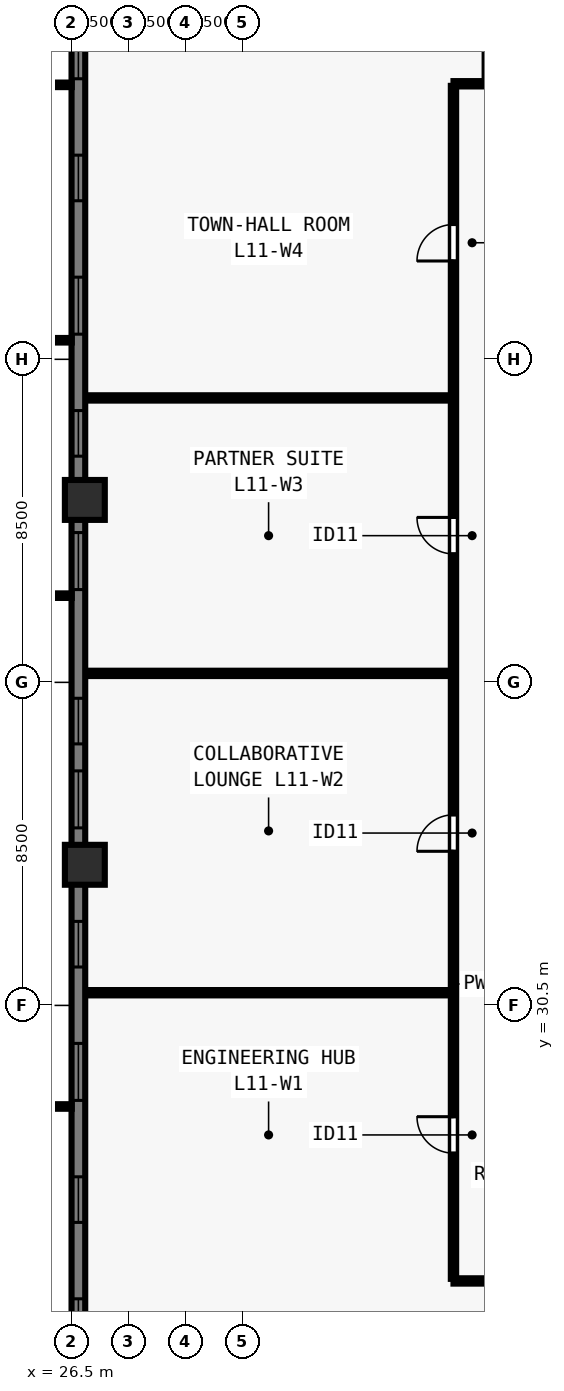
"""IFC4 building model, lengths in metres.
Left out: names, types, materials, properties, quantities, classifications, styles, units other than length and angle.
Written with IfcOpenShell. Run it as: python <this file> out.ifc"""

import sys

from ifc_helpers import new_model, si_unit, direction, frame, frame_2d, origin, origin_2d, place, context, subcontext, project, spatial, rectangle, extrude, element, fill, save


model = new_model("IFC4")
c1 = context("Model", 3, precision=1e-05, world=origin(), true_north=direction((0.0, 1.0)))
c2 = subcontext(c1, "Body", "Model", "MODEL_VIEW")
j1 = project(units=[si_unit("LENGTHUNIT", "METRE"), si_unit("PLANEANGLEUNIT", "RADIAN")], contexts=[c1])
p1 = place(None, origin())
s1 = spatial("IfcSite", under=j1, at=p1, CompositionType="ELEMENT")
p2 = place(p1, origin())
s2 = spatial("IfcBuilding", under=s1, at=p2, CompositionType="ELEMENT")
p3 = place(p2, frame((0.0, 0.0, 44.5)))
s3 = spatial("IfcBuildingStorey", under=s2, at=p3, CompositionType="ELEMENT", Elevation=44.5)
for number, where, z_axis, x_axis in (
    (1, (26.85, 43.8, 0.0), (0.0, 0.0, 1.0), (0.0, 1.0, 0.0)),
    (2, (26.85, 34.2, 0.0), (0.0, 0.0, 1.0), (0.0, 1.0, 0.0)),
):
    element("IfcColumn", number, at=place(p3, frame(where, z_axis=z_axis, x_axis=x_axis)), inside=s3, PredefinedType="COLUMN", context=c2, shape_type="SweptSolid", body=[
        extrude(rectangle(XDim=1.05, YDim=1.05, at=origin_2d()), origin(), (0.0, 0.0, 1.0), 3.5),
    ])
p4 = place(p3, frame((26.68, 16.5, 0.0), z_axis=(0.0, 0.0, 1.0), x_axis=(0.0, 1.0, 0.0)))
e3 = element("IfcWall", 3, at=p4, inside=s3, PredefinedType="SOLIDWALL", context=c2, shape_type="SweptSolid", body=[
    extrude(rectangle(XDim=44.662, YDim=0.36, at=frame_2d((22.331, 0.0))), origin(), (0.0, 0.0, 1.0), 3.28),
])
p5 = place(p4, frame((4.78, 0.0, 0.8)))
e4 = element("IfcOpeningElement", 4, at=p5, cuts=e3, PredefinedType="OPENING", context=c2, shape_type="SweptSolid", body=[
    extrude(rectangle(XDim=1.5, YDim=1.544, at=frame_2d((0.75, 0.772))), frame((0.0, 0.19, 0.0), z_axis=(0.0, -1.0, 0.0), x_axis=(1.0, 0.0, 0.0)), (0.0, 0.0, 1.0), 0.38),
])
p6 = place(p4, frame((8.29, 0.0, 0.8)))
e5 = element("IfcOpeningElement", 5, at=p6, cuts=e3, PredefinedType="OPENING", context=c2, shape_type="SweptSolid", body=[
    extrude(rectangle(XDim=1.2, YDim=1.544, at=frame_2d((0.6, 0.772))), frame((0.0, 0.19, 0.0), z_axis=(0.0, -1.0, 0.0), x_axis=(1.0, 0.0, 0.0)), (0.0, 0.0, 1.0), 0.38),
])
p7 = place(p4, frame((11.5, 0.0, 0.8)))
e6 = element("IfcOpeningElement", 6, at=p7, cuts=e3, PredefinedType="OPENING", context=c2, shape_type="SweptSolid", body=[
    extrude(rectangle(XDim=1.5, YDim=1.544, at=frame_2d((0.75, 0.772))), frame((0.0, 0.19, 0.0), z_axis=(0.0, -1.0, 0.0), x_axis=(1.0, 0.0, 0.0)), (0.0, 0.0, 1.0), 0.38),
])
p8 = place(p4, frame((15.01, 0.0, 0.8)))
e7 = element("IfcOpeningElement", 7, at=p8, cuts=e3, PredefinedType="OPENING", context=c2, shape_type="SweptSolid", body=[
    extrude(rectangle(XDim=1.2, YDim=1.544, at=frame_2d((0.6, 0.772))), frame((0.0, 0.19, 0.0), z_axis=(0.0, -1.0, 0.0), x_axis=(1.0, 0.0, 0.0)), (0.0, 0.0, 1.0), 0.38),
])
p9 = place(p4, frame((18.671, 0.0, 0.8)))
e8 = element("IfcOpeningElement", 8, at=p9, cuts=e3, PredefinedType="OPENING", context=c2, shape_type="SweptSolid", body=[
    extrude(rectangle(XDim=1.5, YDim=1.544, at=frame_2d((0.75, 0.772))), frame((0.0, 0.19, 0.0), z_axis=(0.0, -1.0, 0.0), x_axis=(1.0, 0.0, 0.0)), (0.0, 0.0, 1.0), 0.38),
])
p10 = place(p4, frame((20.881, 0.0, 0.8)))
e9 = element("IfcOpeningElement", 9, at=p10, cuts=e3, PredefinedType="OPENING", context=c2, shape_type="SweptSolid", body=[
    extrude(rectangle(XDim=1.2, YDim=1.544, at=frame_2d((0.6, 0.772))), frame((0.0, 0.19, 0.0), z_axis=(0.0, -1.0, 0.0), x_axis=(1.0, 0.0, 0.0)), (0.0, 0.0, 1.0), 0.38),
])
p11 = place(p4, frame((24.941, 0.0, 0.8)))
e10 = element("IfcOpeningElement", 10, at=p11, cuts=e3, PredefinedType="OPENING", context=c2, shape_type="SweptSolid", body=[
    extrude(rectangle(XDim=1.5, YDim=1.544, at=frame_2d((0.75, 0.772))), frame((0.0, 0.19, 0.0), z_axis=(0.0, -1.0, 0.0), x_axis=(1.0, 0.0, 0.0)), (0.0, 0.0, 1.0), 0.38),
])
p12 = place(p4, frame((28.451, 0.0, 0.8)))
e11 = element("IfcOpeningElement", 11, at=p12, cuts=e3, PredefinedType="OPENING", context=c2, shape_type="SweptSolid", body=[
    extrude(rectangle(XDim=1.2, YDim=1.544, at=frame_2d((0.6, 0.772))), frame((0.0, 0.19, 0.0), z_axis=(0.0, -1.0, 0.0), x_axis=(1.0, 0.0, 0.0)), (0.0, 0.0, 1.0), 0.38),
])
p13 = place(p4, frame((31.662, 0.0, 0.8)))
e12 = element("IfcOpeningElement", 12, at=p13, cuts=e3, PredefinedType="OPENING", context=c2, shape_type="SweptSolid", body=[
    extrude(rectangle(XDim=1.5, YDim=1.544, at=frame_2d((0.75, 0.772))), frame((0.0, 0.19, 0.0), z_axis=(0.0, -1.0, 0.0), x_axis=(1.0, 0.0, 0.0)), (0.0, 0.0, 1.0), 0.38),
])
p14 = place(p4, frame((35.172, 0.0, 0.8)))
e13 = element("IfcOpeningElement", 13, at=p14, cuts=e3, PredefinedType="OPENING", context=c2, shape_type="SweptSolid", body=[
    extrude(rectangle(XDim=1.2, YDim=1.544, at=frame_2d((0.6, 0.772))), frame((0.0, 0.19, 0.0), z_axis=(0.0, -1.0, 0.0), x_axis=(1.0, 0.0, 0.0)), (0.0, 0.0, 1.0), 0.38),
])
p15 = place(p4, frame((38.382, 0.0, 0.8)))
e14 = element("IfcOpeningElement", 14, at=p15, cuts=e3, PredefinedType="OPENING", context=c2, shape_type="SweptSolid", body=[
    extrude(rectangle(XDim=1.5, YDim=1.544, at=frame_2d((0.75, 0.772))), frame((0.0, 0.19, 0.0), z_axis=(0.0, -1.0, 0.0), x_axis=(1.0, 0.0, 0.0)), (0.0, 0.0, 1.0), 0.38),
])
p16 = place(p3, frame((36.55, 23.25, 0.0), z_axis=(0.0, 0.0, 1.0), x_axis=(1.0, 0.0, 0.0)))
e15 = element("IfcWall", 15, at=p16, inside=s3, PredefinedType="PARTITIONING", context=c2, shape_type="SweptSolid", body=[
    extrude(rectangle(XDim=30.9, YDim=0.14, at=frame_2d((15.45, 0.0))), origin(), (0.0, 0.0, 1.0), 3.28),
])
p17 = place(p16, frame((2.386, 0.0, 0.0)))
e16 = element("IfcOpeningElement", 16, at=p17, cuts=e15, PredefinedType="OPENING", context=c2, shape_type="SweptSolid", body=[
    extrude(rectangle(XDim=0.96, YDim=2.12, at=frame_2d((0.48, 1.06))), frame((0.0, 0.08, 0.0), z_axis=(0.0, -1.0, 0.0), x_axis=(1.0, 0.0, 0.0)), (0.0, 0.0, 1.0), 0.16),
])
p18 = place(p16, frame((27.066, 0.0, 0.0)))
e17 = element("IfcOpeningElement", 17, at=p18, cuts=e15, PredefinedType="OPENING", context=c2, shape_type="SweptSolid", body=[
    extrude(rectangle(XDim=0.96, YDim=2.12, at=frame_2d((0.48, 1.06))), frame((0.0, 0.08, 0.0), z_axis=(0.0, -1.0, 0.0), x_axis=(1.0, 0.0, 0.0)), (0.0, 0.0, 1.0), 0.16),
])
p19 = place(p3, frame((36.55, 54.75, 0.0), z_axis=(0.0, 0.0, 1.0), x_axis=(1.0, 0.0, 0.0)))
e18 = element("IfcWall", 18, at=p19, inside=s3, PredefinedType="PARTITIONING", context=c2, shape_type="SweptSolid", body=[
    extrude(rectangle(XDim=30.9, YDim=0.14, at=frame_2d((15.45, 0.0))), origin(), (0.0, 0.0, 1.0), 3.28),
])
p20 = place(p19, frame((3.69, 0.0, 0.0)))
e19 = element("IfcOpeningElement", 19, at=p20, cuts=e18, PredefinedType="OPENING", context=c2, shape_type="SweptSolid", body=[
    extrude(rectangle(XDim=0.96, YDim=2.12, at=frame_2d((0.48, 1.06))), frame((0.0, 0.08, 0.0), z_axis=(0.0, -1.0, 0.0), x_axis=(1.0, 0.0, 0.0)), (0.0, 0.0, 1.0), 0.16),
])
p21 = place(p19, frame((5.013, 0.0, 0.0)))
e20 = element("IfcOpeningElement", 20, at=p21, cuts=e18, PredefinedType="OPENING", context=c2, shape_type="SweptSolid", body=[
    extrude(rectangle(XDim=0.96, YDim=2.12, at=frame_2d((0.48, 1.06))), frame((0.0, 0.08, 0.0), z_axis=(0.0, -1.0, 0.0), x_axis=(1.0, 0.0, 0.0)), (0.0, 0.0, 1.0), 0.16),
])
p22 = place(p19, frame((15.045, 0.0, 0.0)))
e21 = element("IfcOpeningElement", 21, at=p22, cuts=e18, PredefinedType="OPENING", context=c2, shape_type="SweptSolid", body=[
    extrude(rectangle(XDim=0.96, YDim=2.12, at=frame_2d((0.48, 1.06))), frame((0.0, 0.08, 0.0), z_axis=(0.0, -1.0, 0.0), x_axis=(1.0, 0.0, 0.0)), (0.0, 0.0, 1.0), 0.16),
])
p23 = place(p19, frame((25.077, 0.0, 0.0)))
e22 = element("IfcOpeningElement", 22, at=p23, cuts=e18, PredefinedType="OPENING", context=c2, shape_type="SweptSolid", body=[
    extrude(rectangle(XDim=0.96, YDim=2.12, at=frame_2d((0.48, 1.06))), frame((0.0, 0.08, 0.0), z_axis=(0.0, -1.0, 0.0), x_axis=(1.0, 0.0, 0.0)), (0.0, 0.0, 1.0), 0.16),
])
p24 = place(p19, frame((28.92, 0.0, 0.0)))
e23 = element("IfcOpeningElement", 23, at=p24, cuts=e18, PredefinedType="OPENING", context=c2, shape_type="SweptSolid", body=[
    extrude(rectangle(XDim=0.96, YDim=2.12, at=frame_2d((0.48, 1.06))), frame((0.0, 0.08, 0.0), z_axis=(0.0, -1.0, 0.0), x_axis=(1.0, 0.0, 0.0)), (0.0, 0.0, 1.0), 0.16),
])
p25 = place(p3, frame((36.55, 23.305, 0.0), z_axis=(0.0, 0.0, 1.0), x_axis=(0.0, 1.0, 0.0)))
e24 = element("IfcWall", 24, at=p25, inside=s3, PredefinedType="PARTITIONING", context=c2, shape_type="SweptSolid", body=[
    extrude(rectangle(XDim=31.39, YDim=0.14, at=frame_2d((15.695, 0.0))), origin(), (0.0, 0.0, 1.0), 3.28),
])
p26 = place(p25, frame((3.307, 0.0, 0.0)))
e25 = element("IfcOpeningElement", 25, at=p26, cuts=e24, PredefinedType="OPENING", context=c2, shape_type="SweptSolid", body=[
    extrude(rectangle(XDim=0.96, YDim=2.12, at=frame_2d((0.48, 1.06))), frame((0.0, 0.08, 0.0), z_axis=(0.0, -1.0, 0.0), x_axis=(1.0, 0.0, 0.0)), (0.0, 0.0, 1.0), 0.16),
])
p27 = place(p25, frame((11.25, 0.0, 0.0)))
e26 = element("IfcOpeningElement", 26, at=p27, cuts=e24, PredefinedType="OPENING", context=c2, shape_type="SweptSolid", body=[
    extrude(rectangle(XDim=0.96, YDim=2.12, at=frame_2d((0.48, 1.06))), frame((0.0, 0.08, 0.0), z_axis=(0.0, -1.0, 0.0), x_axis=(1.0, 0.0, 0.0)), (0.0, 0.0, 1.0), 0.16),
])
p28 = place(p25, frame((19.075, 0.0, 0.0)))
e27 = element("IfcOpeningElement", 27, at=p28, cuts=e24, PredefinedType="OPENING", context=c2, shape_type="SweptSolid", body=[
    extrude(rectangle(XDim=0.96, YDim=2.12, at=frame_2d((0.48, 1.06))), frame((0.0, 0.08, 0.0), z_axis=(0.0, -1.0, 0.0), x_axis=(1.0, 0.0, 0.0)), (0.0, 0.0, 1.0), 0.16),
])
p29 = place(p25, frame((26.782, 0.0, 0.0)))
e28 = element("IfcOpeningElement", 28, at=p29, cuts=e24, PredefinedType="OPENING", context=c2, shape_type="SweptSolid", body=[
    extrude(rectangle(XDim=0.96, YDim=2.12, at=frame_2d((0.48, 1.06))), frame((0.0, 0.08, 0.0), z_axis=(0.0, -1.0, 0.0), x_axis=(1.0, 0.0, 0.0)), (0.0, 0.0, 1.0), 0.16),
])
p30 = place(p3, frame((37.439, 54.85, 0.0), z_axis=(0.0, 0.0, 1.0), x_axis=(0.0, 1.0, 0.0)))
e29 = element("IfcWall", 29, at=p30, inside=s3, PredefinedType="PARTITIONING", context=c2, shape_type="SweptSolid", body=[
    extrude(rectangle(XDim=9.23, YDim=0.14, at=frame_2d((4.615, 0.0))), origin(), (0.0, 0.0, 1.0), 3.28),
])
p31 = place(p3, frame((26.92, 30.834, 0.0), z_axis=(0.0, 0.0, 1.0), x_axis=(1.0, 0.0, 0.0)))
e30 = element("IfcWall", 30, at=p31, inside=s3, PredefinedType="PARTITIONING", context=c2, shape_type="SweptSolid", body=[
    extrude(rectangle(XDim=9.53, YDim=0.14, at=frame_2d((4.765, 0.0))), origin(), (0.0, 0.0, 1.0), 3.28),
])
p32 = place(p3, frame((26.92, 39.236, 0.0), z_axis=(0.0, 0.0, 1.0), x_axis=(1.0, 0.0, 0.0)))
e31 = element("IfcWall", 31, at=p32, inside=s3, PredefinedType="PARTITIONING", context=c2, shape_type="SweptSolid", body=[
    extrude(rectangle(XDim=9.53, YDim=0.14, at=frame_2d((4.765, 0.0))), origin(), (0.0, 0.0, 1.0), 2.849),
])
p33 = place(p3, frame((26.92, 46.484, 0.0), z_axis=(0.0, 0.0, 1.0), x_axis=(1.0, 0.0, 0.0)))
e32 = element("IfcWall", 32, at=p33, inside=s3, PredefinedType="PARTITIONING", context=c2, shape_type="SweptSolid", body=[
    extrude(rectangle(XDim=9.53, YDim=0.14, at=frame_2d((4.765, 0.0))), origin(), (0.0, 0.0, 1.0), 3.28),
])
p34 = place(p5, origin())
e33 = element("IfcWindow", 33, at=p34, inside=s3, PartitioningType="SINGLE_PANEL", PredefinedType="WINDOW", context=c2, shape_type="SweptSolid", body=[
    extrude(rectangle(XDim=1.5, YDim=1.544, at=frame_2d((0.75, 0.772))), frame((0.0, -0.05, 0.0), z_axis=(0.0, -1.0, 0.0), x_axis=(1.0, 0.0, 0.0)), (0.0, 0.0, 1.0), 0.06),
])
fill(e4, e33)
p35 = place(p6, origin())
e34 = element("IfcWindow", 34, at=p35, inside=s3, PartitioningType="SINGLE_PANEL", PredefinedType="WINDOW", context=c2, shape_type="SweptSolid", body=[
    extrude(rectangle(XDim=1.2, YDim=1.544, at=frame_2d((0.6, 0.772))), frame((0.0, -0.05, 0.0), z_axis=(0.0, -1.0, 0.0), x_axis=(1.0, 0.0, 0.0)), (0.0, 0.0, 1.0), 0.06),
])
fill(e5, e34)
p36 = place(p7, origin())
e35 = element("IfcWindow", 35, at=p36, inside=s3, PartitioningType="SINGLE_PANEL", PredefinedType="WINDOW", context=c2, shape_type="SweptSolid", body=[
    extrude(rectangle(XDim=1.5, YDim=1.544, at=frame_2d((0.75, 0.772))), frame((0.0, -0.05, 0.0), z_axis=(0.0, -1.0, 0.0), x_axis=(1.0, 0.0, 0.0)), (0.0, 0.0, 1.0), 0.06),
])
fill(e6, e35)
p37 = place(p8, origin())
e36 = element("IfcWindow", 36, at=p37, inside=s3, PartitioningType="SINGLE_PANEL", PredefinedType="WINDOW", context=c2, shape_type="SweptSolid", body=[
    extrude(rectangle(XDim=1.2, YDim=1.544, at=frame_2d((0.6, 0.772))), frame((0.0, -0.05, 0.0), z_axis=(0.0, -1.0, 0.0), x_axis=(1.0, 0.0, 0.0)), (0.0, 0.0, 1.0), 0.06),
])
fill(e7, e36)
p38 = place(p9, origin())
e37 = element("IfcWindow", 37, at=p38, inside=s3, PartitioningType="SINGLE_PANEL", PredefinedType="WINDOW", context=c2, shape_type="SweptSolid", body=[
    extrude(rectangle(XDim=1.5, YDim=1.544, at=frame_2d((0.75, 0.772))), frame((0.0, -0.05, 0.0), z_axis=(0.0, -1.0, 0.0), x_axis=(1.0, 0.0, 0.0)), (0.0, 0.0, 1.0), 0.06),
])
fill(e8, e37)
p39 = place(p10, origin())
e38 = element("IfcWindow", 38, at=p39, inside=s3, PartitioningType="SINGLE_PANEL", PredefinedType="WINDOW", context=c2, shape_type="SweptSolid", body=[
    extrude(rectangle(XDim=1.2, YDim=1.544, at=frame_2d((0.6, 0.772))), frame((0.0, -0.05, 0.0), z_axis=(0.0, -1.0, 0.0), x_axis=(1.0, 0.0, 0.0)), (0.0, 0.0, 1.0), 0.06),
])
fill(e9, e38)
p40 = place(p11, origin())
e39 = element("IfcWindow", 39, at=p40, inside=s3, PartitioningType="SINGLE_PANEL", PredefinedType="WINDOW", context=c2, shape_type="SweptSolid", body=[
    extrude(rectangle(XDim=1.5, YDim=1.544, at=frame_2d((0.75, 0.772))), frame((0.0, -0.05, 0.0), z_axis=(0.0, -1.0, 0.0), x_axis=(1.0, 0.0, 0.0)), (0.0, 0.0, 1.0), 0.06),
])
fill(e10, e39)
p41 = place(p12, origin())
e40 = element("IfcWindow", 40, at=p41, inside=s3, PartitioningType="SINGLE_PANEL", PredefinedType="WINDOW", context=c2, shape_type="SweptSolid", body=[
    extrude(rectangle(XDim=1.2, YDim=1.544, at=frame_2d((0.6, 0.772))), frame((0.0, -0.05, 0.0), z_axis=(0.0, -1.0, 0.0), x_axis=(1.0, 0.0, 0.0)), (0.0, 0.0, 1.0), 0.06),
])
fill(e11, e40)
p42 = place(p13, origin())
e41 = element("IfcWindow", 41, at=p42, inside=s3, PartitioningType="SINGLE_PANEL", PredefinedType="WINDOW", context=c2, shape_type="SweptSolid", body=[
    extrude(rectangle(XDim=1.5, YDim=1.544, at=frame_2d((0.75, 0.772))), frame((0.0, -0.05, 0.0), z_axis=(0.0, -1.0, 0.0), x_axis=(1.0, 0.0, 0.0)), (0.0, 0.0, 1.0), 0.06),
])
fill(e12, e41)
p43 = place(p14, origin())
e42 = element("IfcWindow", 42, at=p43, inside=s3, PartitioningType="SINGLE_PANEL", PredefinedType="WINDOW", context=c2, shape_type="SweptSolid", body=[
    extrude(rectangle(XDim=1.2, YDim=1.544, at=frame_2d((0.6, 0.772))), frame((0.0, -0.05, 0.0), z_axis=(0.0, -1.0, 0.0), x_axis=(1.0, 0.0, 0.0)), (0.0, 0.0, 1.0), 0.06),
])
fill(e13, e42)
p44 = place(p15, origin())
e43 = element("IfcWindow", 43, at=p44, inside=s3, PartitioningType="SINGLE_PANEL", PredefinedType="WINDOW", context=c2, shape_type="SweptSolid", body=[
    extrude(rectangle(XDim=1.5, YDim=1.544, at=frame_2d((0.75, 0.772))), frame((0.0, -0.05, 0.0), z_axis=(0.0, -1.0, 0.0), x_axis=(1.0, 0.0, 0.0)), (0.0, 0.0, 1.0), 0.06),
])
fill(e14, e43)
p45 = place(p26, origin())
e44 = element("IfcDoor", 44, at=p45, inside=s3, OperationType="SINGLE_SWING_RIGHT", PredefinedType="DOOR", context=c2, shape_type="SweptSolid", body=[
    extrude(rectangle(XDim=0.96, YDim=2.12, at=frame_2d((0.48, 1.06))), frame((0.0, 0.025, 0.0), z_axis=(0.0, -1.0, 0.0), x_axis=(1.0, 0.0, 0.0)), (0.0, 0.0, 1.0), 0.05),
])
fill(e25, e44)
p46 = place(p27, origin())
e45 = element("IfcDoor", 45, at=p46, inside=s3, OperationType="SINGLE_SWING_LEFT", PredefinedType="DOOR", context=c2, shape_type="SweptSolid", body=[
    extrude(rectangle(XDim=0.96, YDim=2.12, at=frame_2d((0.48, 1.06))), frame((0.0, 0.025, 0.0), z_axis=(0.0, -1.0, 0.0), x_axis=(1.0, 0.0, 0.0)), (0.0, 0.0, 1.0), 0.05),
])
fill(e26, e45)
p47 = place(p28, origin())
e46 = element("IfcDoor", 46, at=p47, inside=s3, OperationType="SINGLE_SWING_RIGHT", PredefinedType="DOOR", context=c2, shape_type="SweptSolid", body=[
    extrude(rectangle(XDim=0.96, YDim=2.12, at=frame_2d((0.48, 1.06))), frame((0.0, 0.025, 0.0), z_axis=(0.0, -1.0, 0.0), x_axis=(1.0, 0.0, 0.0)), (0.0, 0.0, 1.0), 0.05),
])
fill(e27, e46)
p48 = place(p29, origin())
e47 = element("IfcDoor", 47, at=p48, inside=s3, OperationType="SINGLE_SWING_LEFT", PredefinedType="DOOR", context=c2, shape_type="SweptSolid", body=[
    extrude(rectangle(XDim=0.96, YDim=2.12, at=frame_2d((0.48, 1.06))), frame((0.0, 0.025, 0.0), z_axis=(0.0, -1.0, 0.0), x_axis=(1.0, 0.0, 0.0)), (0.0, 0.0, 1.0), 0.05),
])
fill(e28, e47)
save(model, sys.argv[1])
